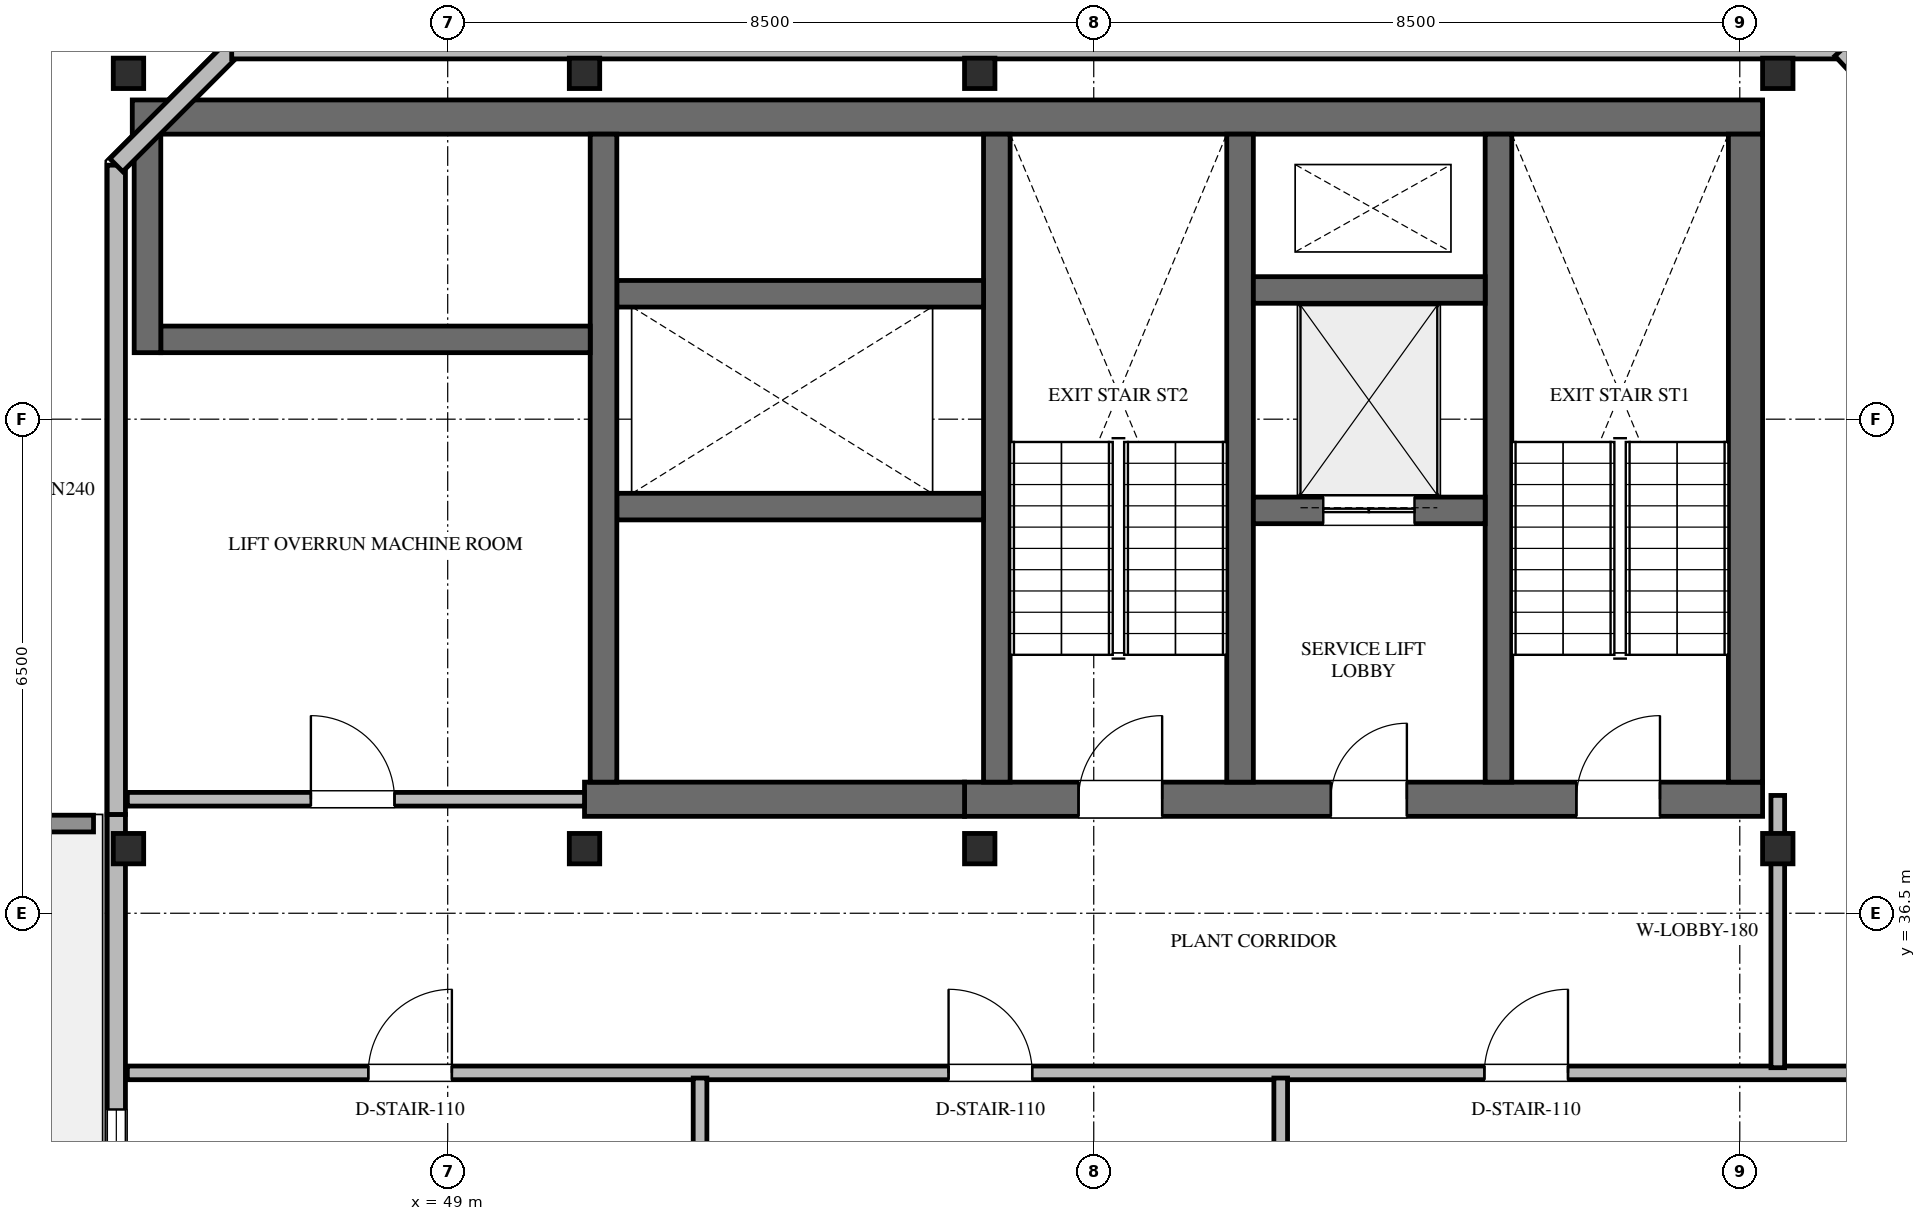
"""IFC4 building model, lengths in metres.
Left out: names, types, materials, properties, quantities, classifications, styles, units other than length and angle.
Written with IfcOpenShell. Run it as: python <this file> out.ifc"""

import sys

from ifc_helpers import new_model, si_unit, direction, frame, frame_2d, origin, origin_2d, place, context, subcontext, project, spatial, rectangle, hollow_rectangle, extrude, element, fill, save


model = new_model("IFC4")
c1 = context("Model", 3, precision=1e-05, world=origin(), true_north=direction((0.0, 1.0)))
c2 = subcontext(c1, "Body", "Model", "MODEL_VIEW")
j1 = project(units=[si_unit("LENGTHUNIT", "METRE"), si_unit("PLANEANGLEUNIT", "RADIAN")], contexts=[c1])
p1 = place(None, origin())
s1 = spatial("IfcSite", under=j1, at=p1, CompositionType="ELEMENT")
p2 = place(p1, origin())
s2 = spatial("IfcBuilding", under=s1, at=p2, CompositionType="ELEMENT")
p3 = place(p2, frame((0.0, 0.0, 315.6)))
s3 = spatial("IfcBuildingStorey", under=s2, at=p3, CompositionType="ELEMENT", Elevation=315.6)
p4 = place(p3, frame((44.85, 46.975, 0.0), z_axis=(0.0, 0.0, 1.0), x_axis=(1.0, 0.0, 0.0)))
e1 = element("IfcWall", 1, at=p4, inside=s3, PredefinedType="SHEAR", context=c2, shape_type="SweptSolid", body=[
    extrude(rectangle(XDim=21.45, YDim=0.45, at=frame_2d((10.725, 0.0))), origin(), (0.0, 0.0, 1.0), 3.6),
])
p5 = place(p3, frame((55.8, 38.0, 0.0), z_axis=(0.0, 0.0, 1.0), x_axis=(1.0, 0.0, 0.0)))
e2 = element("IfcWall", 2, at=p5, inside=s3, PredefinedType="SHEAR", context=c2, shape_type="SweptSolid", body=[
    extrude(rectangle(XDim=10.5, YDim=0.45, at=frame_2d((5.25, 0.0))), origin(), (0.0, 0.0, 1.0), 3.6),
])
p6 = place(p5, frame((1.5, 0.0, 0.0)))
e3 = element("IfcOpeningElement", 3, at=p6, cuts=e2, PredefinedType="OPENING", context=c2, shape_type="SweptSolid", body=[
    extrude(rectangle(XDim=1.1, YDim=2.2, at=frame_2d((0.55, 1.1))), frame((0.0, 0.235, 0.0), z_axis=(0.0, -1.0, 0.0), x_axis=(1.0, 0.0, 0.0)), (0.0, 0.0, 1.0), 0.47),
])
p7 = place(p5, frame((4.82, 0.0, 0.0)))
e4 = element("IfcOpeningElement", 4, at=p7, cuts=e2, PredefinedType="OPENING", context=c2, shape_type="SweptSolid", body=[
    extrude(rectangle(XDim=1.0, YDim=2.15, at=frame_2d((0.5, 1.075))), frame((0.0, 0.235, 0.0), z_axis=(0.0, -1.0, 0.0), x_axis=(1.0, 0.0, 0.0)), (0.0, 0.0, 1.0), 0.47),
])
p8 = place(p5, frame((8.05, 0.0, 0.0)))
e5 = element("IfcOpeningElement", 5, at=p8, cuts=e2, PredefinedType="OPENING", context=c2, shape_type="SweptSolid", body=[
    extrude(rectangle(XDim=1.1, YDim=2.2, at=frame_2d((0.55, 1.1))), frame((0.0, 0.235, 0.0), z_axis=(0.0, -1.0, 0.0), x_axis=(1.0, 0.0, 0.0)), (0.0, 0.0, 1.0), 0.47),
])
p9 = place(p3, frame((66.075, 38.225, 0.0), z_axis=(0.0, 0.0, 1.0), x_axis=(0.0, 1.0, 0.0)))
e6 = element("IfcWall", 6, at=p9, inside=s3, PredefinedType="SHEAR", context=c2, shape_type="SweptSolid", body=[
    extrude(rectangle(XDim=8.525, YDim=0.45, at=frame_2d((4.262, 0.0))), origin(), (0.0, 0.0, 1.0), 3.6),
])
for number, where, z_axis, x_axis in (
    (7, (62.825, 38.225, 0.0), (0.0, 0.0, 1.0), (0.0, 1.0, 0.0)),
    (8, (59.425, 38.225, 0.0), (0.0, 0.0, 1.0), (0.0, 1.0, 0.0)),
    (9, (56.225, 38.225, 0.0), (0.0, 0.0, 1.0), (0.0, 1.0, 0.0)),
):
    element("IfcWall", number, at=place(p3, frame(where, z_axis=z_axis, x_axis=x_axis)), inside=s3, PredefinedType="SHEAR", context=c2, shape_type="SweptSolid", body=[
        extrude(rectangle(XDim=8.525, YDim=0.35, at=frame_2d((4.262, 0.0))), origin(), (0.0, 0.0, 1.0), 3.6),
    ])
p10 = place(p3, frame((59.6, 41.8, 0.0), z_axis=(0.0, 0.0, 1.0), x_axis=(1.0, 0.0, 0.0)))
e10 = element("IfcWall", 10, at=p10, inside=s3, PredefinedType="SHEAR", context=c2, shape_type="SweptSolid", body=[
    extrude(rectangle(XDim=3.05, YDim=0.35, at=frame_2d((1.525, 0.0))), origin(), (0.0, 0.0, 1.0), 3.6),
])
p11 = place(p10, frame((0.92, 0.0, 0.0)))
e11 = element("IfcOpeningElement", 11, at=p11, cuts=e10, PredefinedType="OPENING", context=c2, shape_type="SweptSolid", body=[
    extrude(rectangle(XDim=1.2, YDim=2.2, at=frame_2d((0.6, 1.1))), frame((0.0, 0.185, 0.0), z_axis=(0.0, -1.0, 0.0), x_axis=(1.0, 0.0, 0.0)), (0.0, 0.0, 1.0), 0.37),
])
p12 = place(p3, frame((59.6, 44.7, 0.0), z_axis=(0.0, 0.0, 1.0), x_axis=(1.0, 0.0, 0.0)))
e12 = element("IfcWall", 12, at=p12, inside=s3, PredefinedType="SHEAR", context=c2, shape_type="SweptSolid", body=[
    extrude(rectangle(XDim=3.05, YDim=0.35, at=frame_2d((1.525, 0.0))), origin(), (0.0, 0.0, 1.0), 3.6),
])
p13 = place(p3, frame((50.8, 38.0, 0.0), z_axis=(0.0, 0.0, 1.0), x_axis=(1.0, 0.0, 0.0)))
e13 = element("IfcWall", 13, at=p13, inside=s3, PredefinedType="SHEAR", context=c2, shape_type="SweptSolid", body=[
    extrude(rectangle(XDim=5.0, YDim=0.45, at=frame_2d((2.5, 0.0))), origin(), (0.0, 0.0, 1.0), 3.6),
])
for number, where, z_axis, x_axis in (
    (14, (51.225, 41.85, 0.0), (0.0, 0.0, 1.0), (1.0, 0.0, 0.0)),
    (15, (51.225, 44.65, 0.0), (0.0, 0.0, 1.0), (1.0, 0.0, 0.0)),
):
    element("IfcWall", number, at=place(p3, frame(where, z_axis=z_axis, x_axis=x_axis)), inside=s3, PredefinedType="SHEAR", context=c2, shape_type="SweptSolid", body=[
        extrude(rectangle(XDim=4.825, YDim=0.35, at=frame_2d((2.413, 0.0))), origin(), (0.0, 0.0, 1.0), 3.6),
    ])
p14 = place(p3, frame((51.05, 38.225, 0.0), z_axis=(0.0, 0.0, 1.0), x_axis=(0.0, 1.0, 0.0)))
e16 = element("IfcWall", 16, at=p14, inside=s3, PredefinedType="SHEAR", context=c2, shape_type="SweptSolid", body=[
    extrude(rectangle(XDim=8.525, YDim=0.35, at=frame_2d((4.262, 0.0))), origin(), (0.0, 0.0, 1.0), 3.6),
])
p15 = place(p3, frame((45.225, 44.05, 0.0), z_axis=(0.0, 0.0, 1.0), x_axis=(1.0, 0.0, 0.0)))
e17 = element("IfcWall", 17, at=p15, inside=s3, PredefinedType="SHEAR", context=c2, shape_type="SweptSolid", body=[
    extrude(rectangle(XDim=5.65, YDim=0.35, at=frame_2d((2.825, 0.0))), origin(), (0.0, 0.0, 1.0), 3.6),
])
p16 = place(p3, frame((45.05, 43.875, 0.0), z_axis=(0.0, 0.0, 1.0), x_axis=(0.0, 1.0, 0.0)))
e18 = element("IfcWall", 18, at=p16, inside=s3, PredefinedType="SHEAR", context=c2, shape_type="SweptSolid", body=[
    extrude(rectangle(XDim=2.875, YDim=0.35, at=frame_2d((1.438, 0.0))), origin(), (0.0, 0.0, 1.0), 3.6),
])
for number, where, z_axis, x_axis in (
    (19, (66.5, 47.55, 0.0), (0.0, 0.0, 1.0), (1.0, 0.0, 0.0)),
    (20, (56.0, 47.55, 0.0), (0.0, 0.0, 1.0), (1.0, 0.0, 0.0)),
    (21, (66.5, 37.35, 0.0), (0.0, 0.0, 1.0), (1.0, 0.0, 0.0)),
    (22, (56.0, 37.35, 0.0), (0.0, 0.0, 1.0), (1.0, 0.0, 0.0)),
    (23, (50.8, 47.55, 0.0), (0.0, 0.0, 1.0), (1.0, 0.0, 0.0)),
    (24, (50.8, 37.35, 0.0), (0.0, 0.0, 1.0), (1.0, 0.0, 0.0)),
    (25, (44.8, 37.35, 0.0), (0.0, 0.0, 1.0), (1.0, 0.0, 0.0)),
    (26, (44.8, 47.55, 0.0), (0.0, 0.0, 1.0), (1.0, 0.0, 0.0)),
):
    element("IfcColumn", number, at=place(p3, frame(where, z_axis=z_axis, x_axis=x_axis)), inside=s3, PredefinedType="COLUMN", context=c2, shape_type="SweptSolid", body=[
        extrude(hollow_rectangle(XDim=0.4, YDim=0.4, WallThickness=0.016, at=origin_2d()), origin(), (0.0, 0.0, 1.0), 3.6),
    ])
p17 = place(p3, frame((34.12, 37.68, 0.0), z_axis=(0.0, 0.0, 1.0), x_axis=(1.0, 0.0, 0.0)))
e27 = element("IfcWall", 27, at=p17, inside=s3, PredefinedType="PARAPET", context=c2, shape_type="SweptSolid", body=[
    extrude(rectangle(XDim=10.22, YDim=0.22, at=frame_2d((5.11, 0.0))), origin(), (0.0, 0.0, 1.0), 1.2),
])
p18 = place(p3, frame((44.64, 28.658, 0.0), z_axis=(0.0, 0.0, 1.0), x_axis=(0.0, 1.0, 0.0)))
e28 = element("IfcWall", 28, at=p18, inside=s3, PredefinedType="STANDARD", context=c2, shape_type="SweptSolid", body=[
    extrude(rectangle(XDim=9.142, YDim=0.24, at=frame_2d((4.571, 0.0))), origin(), (0.0, 0.0, 1.0), 2.709),
])
p19 = place(p18, frame((3.76, 0.0, 0.9)))
e29 = element("IfcOpeningElement", 29, at=p19, cuts=e28, PredefinedType="OPENING", context=c2, shape_type="SweptSolid", body=[
    extrude(rectangle(XDim=1.5, YDim=1.6, at=frame_2d((0.75, 0.8))), frame((0.0, 0.13, 0.0), z_axis=(0.0, -1.0, 0.0), x_axis=(1.0, 0.0, 0.0)), (0.0, 0.0, 1.0), 0.26),
])
p20 = place(p3, frame((44.64, 37.8, 0.0), z_axis=(0.0, 0.0, 1.0), x_axis=(0.0, 1.0, 0.0)))
e30 = element("IfcWall", 30, at=p20, inside=s3, PredefinedType="STANDARD", context=c2, shape_type="SweptSolid", body=[
    extrude(rectangle(XDim=8.542, YDim=0.24, at=frame_2d((4.271, 0.0))), origin(), (0.0, 0.0, 1.0), 3.32),
])
p21 = place(p3, frame((44.64, 46.342, 0.0), z_axis=(0.0, 0.0, 1.0), x_axis=(0.707106781187, 0.707106781187, 0.0)))
e31 = element("IfcWall", 31, at=p21, inside=s3, PredefinedType="STANDARD", context=c2, shape_type="SweptSolid", body=[
    extrude(rectangle(XDim=2.147, YDim=0.24, at=frame_2d((1.073, 0.0))), origin(), (0.0, 0.0, 1.0), 3.32),
])
p22 = place(p3, frame((46.158, 47.86, 0.0), z_axis=(0.0, 0.0, 1.0), x_axis=(1.0, 0.0, 0.0)))
e32 = element("IfcWall", 32, at=p22, inside=s3, PredefinedType="STANDARD", context=c2, shape_type="SweptSolid", body=[
    extrude(rectangle(XDim=21.181, YDim=0.24, at=frame_2d((10.591, 0.0))), origin(), (0.0, 0.0, 1.0), 2.709),
])
p23 = place(p3, frame((67.339, 47.86, 0.0), z_axis=(0.0, 0.0, 1.0), x_axis=(0.681396623146, -0.731914367918, 0.0)))
e33 = element("IfcWall", 33, at=p23, inside=s3, PredefinedType="STANDARD", context=c2, shape_type="SweptSolid", body=[
    extrude(rectangle(XDim=2.059, YDim=0.24, at=frame_2d((1.029, 0.0))), origin(), (0.0, 0.0, 1.0), 3.32),
])
p24 = place(p3, frame((68.131, 37.8, 0.0), z_axis=(0.0, 0.0, 1.0), x_axis=(-0.071250837206, -0.997458429308, 0.0)))
e34 = element("IfcWall", 34, at=p24, inside=s3, PredefinedType="STANDARD", context=c2, shape_type="SweptSolid", body=[
    extrude(rectangle(XDim=9.162, YDim=0.24, at=frame_2d((4.581, 0.0))), origin(), (0.0, 0.0, 1.0), 3.32),
])
p25 = place(p24, frame((3.892, 0.0, 0.9)))
e35 = element("IfcOpeningElement", 35, at=p25, cuts=e34, PredefinedType="OPENING", context=c2, shape_type="SweptSolid", body=[
    extrude(rectangle(XDim=1.5, YDim=1.6, at=frame_2d((0.75, 0.8))), frame((0.0, 0.13, 0.0), z_axis=(0.0, -1.0, 0.0), x_axis=(1.0, 0.0, 0.0)), (0.0, 0.0, 1.0), 0.26),
])
p26 = place(p3, frame((44.785, 38.0, 0.0), z_axis=(0.0, 0.0, 1.0), x_axis=(1.0, 0.0, 0.0)))
e36 = element("IfcWall", 36, at=p26, inside=s3, PredefinedType="STANDARD", context=c2, shape_type="SweptSolid", body=[
    extrude(rectangle(XDim=6.015, YDim=0.18, at=frame_2d((3.008, 0.0))), origin(), (0.0, 0.0, 1.0), 2.709),
])
p27 = place(p26, frame((2.415, 0.0, 0.0)))
e37 = element("IfcOpeningElement", 37, at=p27, cuts=e36, PredefinedType="OPENING", context=c2, shape_type="SweptSolid", body=[
    extrude(rectangle(XDim=1.1, YDim=2.2, at=frame_2d((0.55, 1.1))), frame((0.0, 0.1, 0.0), z_axis=(0.0, -1.0, 0.0), x_axis=(1.0, 0.0, 0.0)), (0.0, 0.0, 1.0), 0.2),
])
p28 = place(p3, frame((44.785, 34.4, 0.0), z_axis=(0.0, 0.0, 1.0), x_axis=(1.0, 0.0, 0.0)))
e38 = element("IfcWall", 38, at=p28, inside=s3, PredefinedType="STANDARD", context=c2, shape_type="SweptSolid", body=[
    extrude(rectangle(XDim=22.958, YDim=0.18, at=frame_2d((11.479, 0.0))), origin(), (0.0, 0.0, 1.0), 2.709),
])
p29 = place(p28, frame((3.17, 0.0, 0.0)))
e39 = element("IfcOpeningElement", 39, at=p29, cuts=e38, PredefinedType="OPENING", context=c2, shape_type="SweptSolid", body=[
    extrude(rectangle(XDim=1.1, YDim=2.2, at=frame_2d((0.55, 1.1))), frame((0.0, 0.1, 0.0), z_axis=(0.0, -1.0, 0.0), x_axis=(1.0, 0.0, 0.0)), (0.0, 0.0, 1.0), 0.2),
])
p30 = place(p28, frame((10.805, 0.0, 0.0)))
e40 = element("IfcOpeningElement", 40, at=p30, cuts=e38, PredefinedType="OPENING", context=c2, shape_type="SweptSolid", body=[
    extrude(rectangle(XDim=1.1, YDim=2.2, at=frame_2d((0.55, 1.1))), frame((0.0, 0.1, 0.0), z_axis=(0.0, -1.0, 0.0), x_axis=(1.0, 0.0, 0.0)), (0.0, 0.0, 1.0), 0.2),
])
p31 = place(p28, frame((17.855, 0.0, 0.0)))
e41 = element("IfcOpeningElement", 41, at=p31, cuts=e38, PredefinedType="OPENING", context=c2, shape_type="SweptSolid", body=[
    extrude(rectangle(XDim=1.1, YDim=2.2, at=frame_2d((0.55, 1.1))), frame((0.0, 0.1, 0.0), z_axis=(0.0, -1.0, 0.0), x_axis=(1.0, 0.0, 0.0)), (0.0, 0.0, 1.0), 0.2),
])
p32 = place(p3, frame((66.5, 34.468, 0.0), z_axis=(0.0, 0.0, 1.0), x_axis=(0.0, 1.0, 0.0)))
e42 = element("IfcWall", 42, at=p32, inside=s3, PredefinedType="STANDARD", context=c2, shape_type="SweptSolid", body=[
    extrude(rectangle(XDim=3.582, YDim=0.18, at=frame_2d((1.791, 0.0))), origin(), (0.0, 0.0, 1.0), 2.709),
])
for number, where, z_axis, x_axis in (
    (43, (52.32, 27.285, 0.0), (0.0, 0.0, 1.0), (0.0, 1.0, 0.0)),
    (44, (59.96, 27.285, 0.0), (0.0, 0.0, 1.0), (0.0, 1.0, 0.0)),
):
    element("IfcWall", number, at=place(p3, frame(where, z_axis=z_axis, x_axis=x_axis)), inside=s3, PredefinedType="STANDARD", context=c2, shape_type="SweptSolid", body=[
        extrude(rectangle(XDim=7.047, YDim=0.18, at=frame_2d((3.523, 0.0))), origin(), (0.0, 0.0, 1.0), 2.709),
    ])
p33 = place(p19, origin())
e45 = element("IfcWindow", 45, at=p33, inside=s3, PartitioningType="SINGLE_PANEL", PredefinedType="WINDOW", context=c2, shape_type="SweptSolid", body=[
    extrude(rectangle(XDim=1.5, YDim=1.6, at=frame_2d((0.75, 0.8))), frame((0.0, 0.03, 0.0), z_axis=(0.0, -1.0, 0.0), x_axis=(1.0, 0.0, 0.0)), (0.0, 0.0, 1.0), 0.06),
])
fill(e29, e45)
p34 = place(p6, origin())
e46 = element("IfcDoor", 46, at=p34, inside=s3, OperationType="SINGLE_SWING_RIGHT", PredefinedType="DOOR", context=c2, shape_type="SweptSolid", body=[
    extrude(rectangle(XDim=1.1, YDim=2.2, at=frame_2d((0.55, 1.1))), frame((0.0, 0.025, 0.0), z_axis=(0.0, -1.0, 0.0), x_axis=(1.0, 0.0, 0.0)), (0.0, 0.0, 1.0), 0.05),
])
fill(e3, e46)
p35 = place(p7, origin())
e47 = element("IfcDoor", 47, at=p35, inside=s3, OperationType="SINGLE_SWING_RIGHT", PredefinedType="DOOR", context=c2, shape_type="SweptSolid", body=[
    extrude(rectangle(XDim=1.0, YDim=2.15, at=frame_2d((0.5, 1.075))), frame((0.0, 0.025, 0.0), z_axis=(0.0, -1.0, 0.0), x_axis=(1.0, 0.0, 0.0)), (0.0, 0.0, 1.0), 0.05),
])
fill(e4, e47)
p36 = place(p8, origin())
e48 = element("IfcDoor", 48, at=p36, inside=s3, OperationType="SINGLE_SWING_RIGHT", PredefinedType="DOOR", context=c2, shape_type="SweptSolid", body=[
    extrude(rectangle(XDim=1.1, YDim=2.2, at=frame_2d((0.55, 1.1))), frame((0.0, 0.025, 0.0), z_axis=(0.0, -1.0, 0.0), x_axis=(1.0, 0.0, 0.0)), (0.0, 0.0, 1.0), 0.05),
])
fill(e5, e48)
p37 = place(p11, origin())
e49 = element("IfcDoor", 49, at=p37, inside=s3, OperationType="DOUBLE_DOOR_SLIDING", PredefinedType="DOOR", context=c2, shape_type="SweptSolid", body=[
    extrude(rectangle(XDim=1.2, YDim=2.2, at=frame_2d((0.6, 1.1))), frame((0.0, 0.025, 0.0), z_axis=(0.0, -1.0, 0.0), x_axis=(1.0, 0.0, 0.0)), (0.0, 0.0, 1.0), 0.05),
])
fill(e11, e49)
p38 = place(p27, origin())
e50 = element("IfcDoor", 50, at=p38, inside=s3, OperationType="SINGLE_SWING_LEFT", PredefinedType="DOOR", context=c2, shape_type="SweptSolid", body=[
    extrude(rectangle(XDim=1.1, YDim=2.2, at=frame_2d((0.55, 1.1))), frame((0.0, 0.025, 0.0), z_axis=(0.0, -1.0, 0.0), x_axis=(1.0, 0.0, 0.0)), (0.0, 0.0, 1.0), 0.05),
])
fill(e37, e50)
p39 = place(p29, origin())
e51 = element("IfcDoor", 51, at=p39, inside=s3, OperationType="SINGLE_SWING_RIGHT", PredefinedType="DOOR", context=c2, shape_type="SweptSolid", body=[
    extrude(rectangle(XDim=1.1, YDim=2.2, at=frame_2d((0.55, 1.1))), frame((0.0, 0.025, 0.0), z_axis=(0.0, -1.0, 0.0), x_axis=(1.0, 0.0, 0.0)), (0.0, 0.0, 1.0), 0.05),
])
fill(e39, e51)
p40 = place(p30, origin())
e52 = element("IfcDoor", 52, at=p40, inside=s3, OperationType="SINGLE_SWING_LEFT", PredefinedType="DOOR", context=c2, shape_type="SweptSolid", body=[
    extrude(rectangle(XDim=1.1, YDim=2.2, at=frame_2d((0.55, 1.1))), frame((0.0, 0.025, 0.0), z_axis=(0.0, -1.0, 0.0), x_axis=(1.0, 0.0, 0.0)), (0.0, 0.0, 1.0), 0.05),
])
fill(e40, e52)
p41 = place(p31, origin())
e53 = element("IfcDoor", 53, at=p41, inside=s3, OperationType="SINGLE_SWING_RIGHT", PredefinedType="DOOR", context=c2, shape_type="SweptSolid", body=[
    extrude(rectangle(XDim=1.1, YDim=2.2, at=frame_2d((0.55, 1.1))), frame((0.0, 0.025, 0.0), z_axis=(0.0, -1.0, 0.0), x_axis=(1.0, 0.0, 0.0)), (0.0, 0.0, 1.0), 0.05),
])
fill(e41, e53)
save(model, sys.argv[1])
